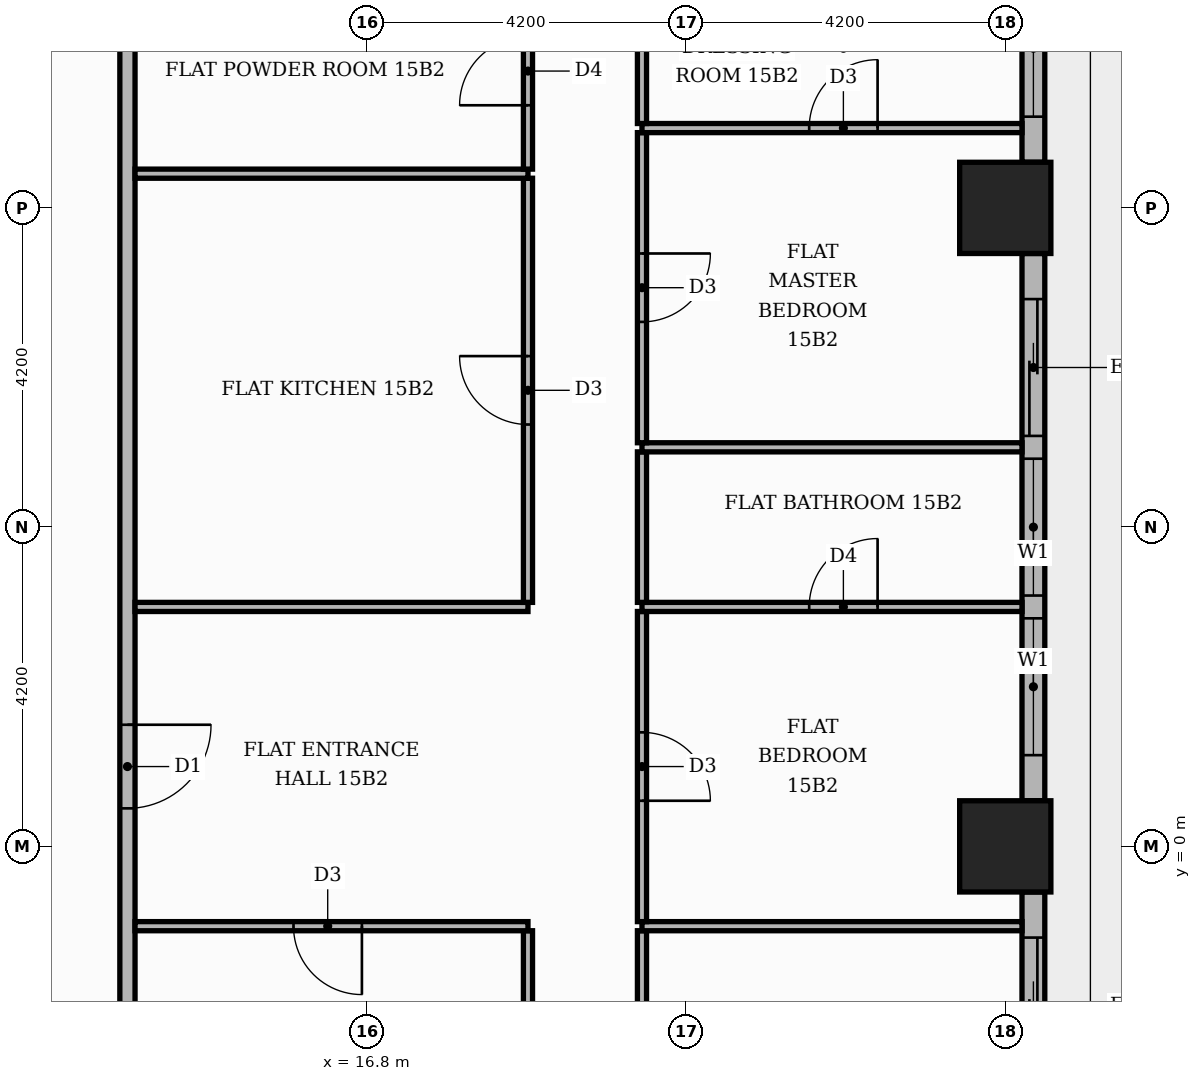
"""IFC4 building model, lengths in metres.
Left out: names, types, materials, properties, quantities, classifications, styles, units other than length and angle.
Written with IfcOpenShell. Run it as: python <this file> out.ifc"""

import sys

from ifc_helpers import new_model, si_unit, direction, frame, frame_2d, origin, origin_2d, place, context, subcontext, project, spatial, rectangle, extrude, element, fill, save


model = new_model("IFC4")
c1 = context("Model", 3, precision=1e-05, world=origin(), true_north=direction((0.0, 1.0)))
c2 = subcontext(c1, "Body", "Model", "MODEL_VIEW")
j1 = project(units=[si_unit("LENGTHUNIT", "METRE"), si_unit("PLANEANGLEUNIT", "RADIAN")], contexts=[c1])
p1 = place(None, origin())
s1 = spatial("IfcSite", under=j1, at=p1, CompositionType="ELEMENT")
p2 = place(p1, origin())
s2 = spatial("IfcBuilding", under=s1, at=p2, CompositionType="ELEMENT")
p3 = place(p2, frame((0.0, 0.0, 66.0)))
s3 = spatial("IfcBuildingStorey", under=s2, at=p3, CompositionType="ELEMENT", Elevation=66.0)
for number, where, z_axis, x_axis in (
    (1, (25.2, 0.0, 0.0), (0.0, 0.0, 1.0), (1.0, 0.0, 0.0)),
    (2, (25.2, 8.4, 0.0), (0.0, 0.0, 1.0), (1.0, 0.0, 0.0)),
):
    element("IfcColumn", number, at=place(p3, frame(where, z_axis=z_axis, x_axis=x_axis)), inside=s3, PredefinedType="COLUMN", context=c2, shape_type="SweptSolid", body=[
        extrude(rectangle(XDim=1.2, YDim=1.2, at=origin_2d()), origin(), (0.0, 0.0, 1.0), 3.9),
    ])
p4 = place(p3, frame((25.57, -7.8, 0.0), z_axis=(0.0, 0.0, 1.0), x_axis=(0.0, 1.0, 0.0)))
e3 = element("IfcWall", 3, at=p4, inside=s3, PredefinedType="STANDARD", context=c2, shape_type="SweptSolid", body=[
    extrude(rectangle(XDim=7.2, YDim=0.3, at=frame_2d((3.6, 0.0))), origin(), (0.0, 0.0, 1.0), 3.48),
])
p5 = place(p4, frame((0.6, 0.0, 0.9)))
e4 = element("IfcOpeningElement", 4, at=p5, cuts=e3, PredefinedType="OPENING", context=c2, shape_type="SweptSolid", body=[
    extrude(rectangle(XDim=1.8, YDim=2.1, at=frame_2d((0.9, 1.05))), frame((0.0, 0.16, 0.0), z_axis=(0.0, -1.0, 0.0), x_axis=(1.0, 0.0, 0.0)), (0.0, 0.0, 1.0), 0.32),
])
p6 = place(p4, frame((2.7, 0.0, 0.9)))
e5 = element("IfcOpeningElement", 5, at=p6, cuts=e3, PredefinedType="OPENING", context=c2, shape_type="SweptSolid", body=[
    extrude(rectangle(XDim=1.8, YDim=2.1, at=frame_2d((0.9, 1.05))), frame((0.0, 0.16, 0.0), z_axis=(0.0, -1.0, 0.0), x_axis=(1.0, 0.0, 0.0)), (0.0, 0.0, 1.0), 0.32),
])
p7 = place(p4, frame((4.8, 0.0, 0.0)))
e6 = element("IfcOpeningElement", 6, at=p7, cuts=e3, PredefinedType="OPENING", context=c2, shape_type="SweptSolid", body=[
    extrude(rectangle(XDim=1.8, YDim=2.4, at=frame_2d((0.9, 1.2))), frame((0.0, 0.16, 0.0), z_axis=(0.0, -1.0, 0.0), x_axis=(1.0, 0.0, 0.0)), (0.0, 0.0, 1.0), 0.32),
])
p8 = place(p3, frame((25.57, 0.6, 0.0), z_axis=(0.0, 0.0, 1.0), x_axis=(0.0, 1.0, 0.0)))
e7 = element("IfcWall", 7, at=p8, inside=s3, PredefinedType="STANDARD", context=c2, shape_type="SweptSolid", body=[
    extrude(rectangle(XDim=7.2, YDim=0.3, at=frame_2d((3.6, 0.0))), origin(), (0.0, 0.0, 1.0), 3.48),
])
p9 = place(p8, frame((0.6, 0.0, 0.9)))
e8 = element("IfcOpeningElement", 8, at=p9, cuts=e7, PredefinedType="OPENING", context=c2, shape_type="SweptSolid", body=[
    extrude(rectangle(XDim=1.8, YDim=2.1, at=frame_2d((0.9, 1.05))), frame((0.0, 0.16, 0.0), z_axis=(0.0, -1.0, 0.0), x_axis=(1.0, 0.0, 0.0)), (0.0, 0.0, 1.0), 0.32),
])
p10 = place(p8, frame((2.7, 0.0, 0.9)))
e9 = element("IfcOpeningElement", 9, at=p10, cuts=e7, PredefinedType="OPENING", context=c2, shape_type="SweptSolid", body=[
    extrude(rectangle(XDim=1.8, YDim=2.1, at=frame_2d((0.9, 1.05))), frame((0.0, 0.16, 0.0), z_axis=(0.0, -1.0, 0.0), x_axis=(1.0, 0.0, 0.0)), (0.0, 0.0, 1.0), 0.32),
])
p11 = place(p8, frame((4.8, 0.0, 0.0)))
e10 = element("IfcOpeningElement", 10, at=p11, cuts=e7, PredefinedType="OPENING", context=c2, shape_type="SweptSolid", body=[
    extrude(rectangle(XDim=1.8, YDim=2.4, at=frame_2d((0.9, 1.2))), frame((0.0, 0.16, 0.0), z_axis=(0.0, -1.0, 0.0), x_axis=(1.0, 0.0, 0.0)), (0.0, 0.0, 1.0), 0.32),
])
p12 = place(p3, frame((25.57, 9.0, 0.0), z_axis=(0.0, 0.0, 1.0), x_axis=(0.0, 1.0, 0.0)))
e11 = element("IfcWall", 11, at=p12, inside=s3, PredefinedType="STANDARD", context=c2, shape_type="SweptSolid", body=[
    extrude(rectangle(XDim=7.2, YDim=0.3, at=frame_2d((3.6, 0.0))), origin(), (0.0, 0.0, 1.0), 3.48),
])
p13 = place(p12, frame((0.6, 0.0, 0.9)))
e12 = element("IfcOpeningElement", 12, at=p13, cuts=e11, PredefinedType="OPENING", context=c2, shape_type="SweptSolid", body=[
    extrude(rectangle(XDim=1.8, YDim=2.1, at=frame_2d((0.9, 1.05))), frame((0.0, 0.16, 0.0), z_axis=(0.0, -1.0, 0.0), x_axis=(1.0, 0.0, 0.0)), (0.0, 0.0, 1.0), 0.32),
])
p14 = place(p12, frame((2.7, 0.0, 0.9)))
e13 = element("IfcOpeningElement", 13, at=p14, cuts=e11, PredefinedType="OPENING", context=c2, shape_type="SweptSolid", body=[
    extrude(rectangle(XDim=1.8, YDim=2.1, at=frame_2d((0.9, 1.05))), frame((0.0, 0.16, 0.0), z_axis=(0.0, -1.0, 0.0), x_axis=(1.0, 0.0, 0.0)), (0.0, 0.0, 1.0), 0.32),
])
p15 = place(p12, frame((4.8, 0.0, 0.9)))
e14 = element("IfcOpeningElement", 14, at=p15, cuts=e11, PredefinedType="OPENING", context=c2, shape_type="SweptSolid", body=[
    extrude(rectangle(XDim=1.8, YDim=2.1, at=frame_2d((0.9, 1.05))), frame((0.0, 0.16, 0.0), z_axis=(0.0, -1.0, 0.0), x_axis=(1.0, 0.0, 0.0)), (0.0, 0.0, 1.0), 0.32),
])
p16 = place(p3, frame((13.65, -5.15, 0.0), z_axis=(0.0, 0.0, 1.0), x_axis=(0.0, 1.0, 0.0)))
e15 = element("IfcWall", 15, at=p16, inside=s3, PredefinedType="PARTITIONING", context=c2, shape_type="SweptSolid", body=[
    extrude(rectangle(XDim=18.7, YDim=0.2, at=frame_2d((9.35, 0.0))), origin(), (0.0, 0.0, 1.0), 3.48),
])
p17 = place(p16, frame((5.65, 0.0, 0.0)))
e16 = element("IfcOpeningElement", 16, at=p17, cuts=e15, PredefinedType="OPENING", context=c2, shape_type="SweptSolid", body=[
    extrude(rectangle(XDim=1.1, YDim=2.4, at=frame_2d((0.55, 1.2))), frame((0.0, 0.11, 0.0), z_axis=(0.0, -1.0, 0.0), x_axis=(1.0, 0.0, 0.0)), (0.0, 0.0, 1.0), 0.22),
])
p18 = place(p3, frame((18.92, -5.15, 0.0), z_axis=(0.0, 0.0, 1.0), x_axis=(0.0, 1.0, 0.0)))
e17 = element("IfcWall", 17, at=p18, inside=s3, PredefinedType="PARTITIONING", context=c2, shape_type="SweptSolid", body=[
    extrude(rectangle(XDim=4.04, YDim=0.12, at=frame_2d((2.02, 0.0))), origin(), (0.0, 0.0, 1.0), 3.48),
])
p19 = place(p3, frame((20.42, -5.15, 0.0), z_axis=(0.0, 0.0, 1.0), x_axis=(0.0, 1.0, 0.0)))
e18 = element("IfcWall", 18, at=p19, inside=s3, PredefinedType="PARTITIONING", context=c2, shape_type="SweptSolid", body=[
    extrude(rectangle(XDim=4.04, YDim=0.12, at=frame_2d((2.02, 0.0))), origin(), (0.0, 0.0, 1.0), 3.48),
])
p20 = place(p19, frame((1.5, 0.0, 0.0)))
e19 = element("IfcOpeningElement", 19, at=p20, cuts=e18, PredefinedType="OPENING", context=c2, shape_type="SweptSolid", body=[
    extrude(rectangle(XDim=1.0, YDim=2.1, at=frame_2d((0.5, 1.05))), frame((0.0, 0.07, 0.0), z_axis=(0.0, -1.0, 0.0), x_axis=(1.0, 0.0, 0.0)), (0.0, 0.0, 1.0), 0.14),
])
p21 = place(p3, frame((13.75, -1.05, 0.0), z_axis=(0.0, 0.0, 1.0), x_axis=(1.0, 0.0, 0.0)))
e20 = element("IfcWall", 20, at=p21, inside=s3, PredefinedType="PARTITIONING", context=c2, shape_type="SweptSolid", body=[
    extrude(rectangle(XDim=5.17, YDim=0.12, at=frame_2d((2.585, 0.0))), origin(), (0.0, 0.0, 1.0), 3.48),
])
p22 = place(p21, frame((2.085, 0.0, 0.0)))
e21 = element("IfcOpeningElement", 21, at=p22, cuts=e20, PredefinedType="OPENING", context=c2, shape_type="SweptSolid", body=[
    extrude(rectangle(XDim=0.9, YDim=2.1, at=frame_2d((0.45, 1.05))), frame((0.0, 0.07, 0.0), z_axis=(0.0, -1.0, 0.0), x_axis=(1.0, 0.0, 0.0)), (0.0, 0.0, 1.0), 0.14),
])
p23 = place(p3, frame((20.42, -1.05, 0.0), z_axis=(0.0, 0.0, 1.0), x_axis=(1.0, 0.0, 0.0)))
e22 = element("IfcWall", 22, at=p23, inside=s3, PredefinedType="PARTITIONING", context=c2, shape_type="SweptSolid", body=[
    extrude(rectangle(XDim=5.0, YDim=0.12, at=frame_2d((2.5, 0.0))), origin(), (0.0, 0.0, 1.0), 3.48),
])
p24 = place(p3, frame((20.42, -0.99, 0.0), z_axis=(0.0, 0.0, 1.0), x_axis=(0.0, 1.0, 0.0)))
e23 = element("IfcWall", 23, at=p24, inside=s3, PredefinedType="PARTITIONING", context=c2, shape_type="SweptSolid", body=[
    extrude(rectangle(XDim=4.08, YDim=0.12, at=frame_2d((2.04, 0.0))), origin(), (0.0, 0.0, 1.0), 3.48),
])
p25 = place(p24, frame((1.59, 0.0, 0.0)))
e24 = element("IfcOpeningElement", 24, at=p25, cuts=e23, PredefinedType="OPENING", context=c2, shape_type="SweptSolid", body=[
    extrude(rectangle(XDim=0.9, YDim=2.1, at=frame_2d((0.45, 1.05))), frame((0.0, 0.07, 0.0), z_axis=(0.0, -1.0, 0.0), x_axis=(1.0, 0.0, 0.0)), (0.0, 0.0, 1.0), 0.14),
])
p26 = place(p3, frame((13.75, 3.15, 0.0), z_axis=(0.0, 0.0, 1.0), x_axis=(1.0, 0.0, 0.0)))
e25 = element("IfcWall", 25, at=p26, inside=s3, PredefinedType="PARTITIONING", context=c2, shape_type="SweptSolid", body=[
    extrude(rectangle(XDim=5.17, YDim=0.12, at=frame_2d((2.585, 0.0))), origin(), (0.0, 0.0, 1.0), 3.48),
])
p27 = place(p3, frame((20.42, 3.15, 0.0), z_axis=(0.0, 0.0, 1.0), x_axis=(1.0, 0.0, 0.0)))
e26 = element("IfcWall", 26, at=p27, inside=s3, PredefinedType="PARTITIONING", context=c2, shape_type="SweptSolid", body=[
    extrude(rectangle(XDim=5.0, YDim=0.12, at=frame_2d((2.5, 0.0))), origin(), (0.0, 0.0, 1.0), 3.48),
])
p28 = place(p27, frame((2.2, 0.0, 0.0)))
e27 = element("IfcOpeningElement", 27, at=p28, cuts=e26, PredefinedType="OPENING", context=c2, shape_type="SweptSolid", body=[
    extrude(rectangle(XDim=0.9, YDim=2.1, at=frame_2d((0.45, 1.05))), frame((0.0, 0.07, 0.0), z_axis=(0.0, -1.0, 0.0), x_axis=(1.0, 0.0, 0.0)), (0.0, 0.0, 1.0), 0.14),
])
p29 = place(p3, frame((18.92, 3.21, 0.0), z_axis=(0.0, 0.0, 1.0), x_axis=(0.0, 1.0, 0.0)))
e28 = element("IfcWall", 28, at=p29, inside=s3, PredefinedType="PARTITIONING", context=c2, shape_type="SweptSolid", body=[
    extrude(rectangle(XDim=5.58, YDim=0.12, at=frame_2d((2.79, 0.0))), origin(), (0.0, 0.0, 1.0), 3.48),
])
p30 = place(p29, frame((2.34, 0.0, 0.0)))
e29 = element("IfcOpeningElement", 29, at=p30, cuts=e28, PredefinedType="OPENING", context=c2, shape_type="SweptSolid", body=[
    extrude(rectangle(XDim=0.9, YDim=2.1, at=frame_2d((0.45, 1.05))), frame((0.0, 0.07, 0.0), z_axis=(0.0, -1.0, 0.0), x_axis=(1.0, 0.0, 0.0)), (0.0, 0.0, 1.0), 0.14),
])
p31 = place(p3, frame((20.42, 3.21, 0.0), z_axis=(0.0, 0.0, 1.0), x_axis=(0.0, 1.0, 0.0)))
e30 = element("IfcWall", 30, at=p31, inside=s3, PredefinedType="PARTITIONING", context=c2, shape_type="SweptSolid", body=[
    extrude(rectangle(XDim=1.98, YDim=0.12, at=frame_2d((0.99, 0.0))), origin(), (0.0, 0.0, 1.0), 3.48),
])
p32 = place(p3, frame((20.42, 5.25, 0.0), z_axis=(0.0, 0.0, 1.0), x_axis=(1.0, 0.0, 0.0)))
e31 = element("IfcWall", 31, at=p32, inside=s3, PredefinedType="PARTITIONING", context=c2, shape_type="SweptSolid", body=[
    extrude(rectangle(XDim=5.0, YDim=0.12, at=frame_2d((2.5, 0.0))), origin(), (0.0, 0.0, 1.0), 3.48),
])
p33 = place(p3, frame((20.42, 5.31, 0.0), z_axis=(0.0, 0.0, 1.0), x_axis=(0.0, 1.0, 0.0)))
e32 = element("IfcWall", 32, at=p33, inside=s3, PredefinedType="PARTITIONING", context=c2, shape_type="SweptSolid", body=[
    extrude(rectangle(XDim=4.08, YDim=0.12, at=frame_2d((2.04, 0.0))), origin(), (0.0, 0.0, 1.0), 3.48),
])
p34 = place(p33, frame((1.59, 0.0, 0.0)))
e33 = element("IfcOpeningElement", 33, at=p34, cuts=e32, PredefinedType="OPENING", context=c2, shape_type="SweptSolid", body=[
    extrude(rectangle(XDim=0.9, YDim=2.1, at=frame_2d((0.45, 1.05))), frame((0.0, 0.07, 0.0), z_axis=(0.0, -1.0, 0.0), x_axis=(1.0, 0.0, 0.0)), (0.0, 0.0, 1.0), 0.14),
])
p35 = place(p3, frame((13.75, 8.85, 0.0), z_axis=(0.0, 0.0, 1.0), x_axis=(1.0, 0.0, 0.0)))
e34 = element("IfcWall", 34, at=p35, inside=s3, PredefinedType="PARTITIONING", context=c2, shape_type="SweptSolid", body=[
    extrude(rectangle(XDim=5.17, YDim=0.12, at=frame_2d((2.585, 0.0))), origin(), (0.0, 0.0, 1.0), 3.48),
])
p36 = place(p3, frame((18.92, 8.91, 0.0), z_axis=(0.0, 0.0, 1.0), x_axis=(0.0, 1.0, 0.0)))
e35 = element("IfcWall", 35, at=p36, inside=s3, PredefinedType="PARTITIONING", context=c2, shape_type="SweptSolid", body=[
    extrude(rectangle(XDim=2.58, YDim=0.12, at=frame_2d((1.29, 0.0))), origin(), (0.0, 0.0, 1.0), 3.48),
])
p37 = place(p36, frame((0.84, 0.0, 0.0)))
e36 = element("IfcOpeningElement", 36, at=p37, cuts=e35, PredefinedType="OPENING", context=c2, shape_type="SweptSolid", body=[
    extrude(rectangle(XDim=0.9, YDim=2.1, at=frame_2d((0.45, 1.05))), frame((0.0, 0.07, 0.0), z_axis=(0.0, -1.0, 0.0), x_axis=(1.0, 0.0, 0.0)), (0.0, 0.0, 1.0), 0.14),
])
p38 = place(p3, frame((20.42, 9.45, 0.0), z_axis=(0.0, 0.0, 1.0), x_axis=(1.0, 0.0, 0.0)))
e37 = element("IfcWall", 37, at=p38, inside=s3, PredefinedType="PARTITIONING", context=c2, shape_type="SweptSolid", body=[
    extrude(rectangle(XDim=5.0, YDim=0.12, at=frame_2d((2.5, 0.0))), origin(), (0.0, 0.0, 1.0), 3.48),
])
p39 = place(p38, frame((2.2, 0.0, 0.0)))
e38 = element("IfcOpeningElement", 38, at=p39, cuts=e37, PredefinedType="OPENING", context=c2, shape_type="SweptSolid", body=[
    extrude(rectangle(XDim=0.9, YDim=2.1, at=frame_2d((0.45, 1.05))), frame((0.0, 0.07, 0.0), z_axis=(0.0, -1.0, 0.0), x_axis=(1.0, 0.0, 0.0)), (0.0, 0.0, 1.0), 0.14),
])
p40 = place(p3, frame((20.42, 9.51, 0.0), z_axis=(0.0, 0.0, 1.0), x_axis=(0.0, 1.0, 0.0)))
e39 = element("IfcWall", 39, at=p40, inside=s3, PredefinedType="PARTITIONING", context=c2, shape_type="SweptSolid", body=[
    extrude(rectangle(XDim=1.98, YDim=0.12, at=frame_2d((0.99, 0.0))), origin(), (0.0, 0.0, 1.0), 3.48),
])
p41 = place(p7, origin())
e40 = element("IfcDoor", 40, at=p41, inside=s3, OperationType="SLIDING_TO_RIGHT", PredefinedType="DOOR", context=c2, shape_type="SweptSolid", body=[
    extrude(rectangle(XDim=1.8, YDim=2.4, at=frame_2d((0.9, 1.2))), frame((0.0, 0.025, 0.0), z_axis=(0.0, -1.0, 0.0), x_axis=(1.0, 0.0, 0.0)), (0.0, 0.0, 1.0), 0.05),
])
fill(e6, e40)
p42 = place(p9, origin())
e41 = element("IfcWindow", 41, at=p42, inside=s3, PartitioningType="SINGLE_PANEL", PredefinedType="WINDOW", context=c2, shape_type="SweptSolid", body=[
    extrude(rectangle(XDim=1.8, YDim=2.1, at=frame_2d((0.9, 1.05))), frame((0.0, 0.03, 0.0), z_axis=(0.0, -1.0, 0.0), x_axis=(1.0, 0.0, 0.0)), (0.0, 0.0, 1.0), 0.06),
])
fill(e8, e41)
p43 = place(p10, origin())
e42 = element("IfcWindow", 42, at=p43, inside=s3, PartitioningType="SINGLE_PANEL", PredefinedType="WINDOW", context=c2, shape_type="SweptSolid", body=[
    extrude(rectangle(XDim=1.8, YDim=2.1, at=frame_2d((0.9, 1.05))), frame((0.0, 0.03, 0.0), z_axis=(0.0, -1.0, 0.0), x_axis=(1.0, 0.0, 0.0)), (0.0, 0.0, 1.0), 0.06),
])
fill(e9, e42)
p44 = place(p11, origin())
e43 = element("IfcDoor", 43, at=p44, inside=s3, OperationType="SLIDING_TO_RIGHT", PredefinedType="DOOR", context=c2, shape_type="SweptSolid", body=[
    extrude(rectangle(XDim=1.8, YDim=2.4, at=frame_2d((0.9, 1.2))), frame((0.0, 0.025, 0.0), z_axis=(0.0, -1.0, 0.0), x_axis=(1.0, 0.0, 0.0)), (0.0, 0.0, 1.0), 0.05),
])
fill(e10, e43)
p45 = place(p13, origin())
e44 = element("IfcWindow", 44, at=p45, inside=s3, PartitioningType="SINGLE_PANEL", PredefinedType="WINDOW", context=c2, shape_type="SweptSolid", body=[
    extrude(rectangle(XDim=1.8, YDim=2.1, at=frame_2d((0.9, 1.05))), frame((0.0, 0.03, 0.0), z_axis=(0.0, -1.0, 0.0), x_axis=(1.0, 0.0, 0.0)), (0.0, 0.0, 1.0), 0.06),
])
fill(e12, e44)
p46 = place(p17, frame((1.1, 0.0, 0.0), z_axis=(0.0, 0.0, 1.0), x_axis=(-1.0, 0.0, 0.0)))
e45 = element("IfcDoor", 45, at=p46, inside=s3, OperationType="SINGLE_SWING_RIGHT", PredefinedType="DOOR", context=c2, shape_type="SweptSolid", body=[
    extrude(rectangle(XDim=1.1, YDim=2.4, at=frame_2d((0.55, 1.2))), frame((0.0, 0.025, 0.0), z_axis=(0.0, -1.0, 0.0), x_axis=(1.0, 0.0, 0.0)), (0.0, 0.0, 1.0), 0.05),
])
fill(e16, e45)
p47 = place(p22, frame((0.9, 0.0, 0.0), z_axis=(0.0, 0.0, 1.0), x_axis=(-1.0, 0.0, 0.0)))
e46 = element("IfcDoor", 46, at=p47, inside=s3, OperationType="SINGLE_SWING_RIGHT", PredefinedType="DOOR", context=c2, shape_type="SweptSolid", body=[
    extrude(rectangle(XDim=0.9, YDim=2.1, at=frame_2d((0.45, 1.05))), frame((0.0, 0.025, 0.0), z_axis=(0.0, -1.0, 0.0), x_axis=(1.0, 0.0, 0.0)), (0.0, 0.0, 1.0), 0.05),
])
fill(e21, e46)
p48 = place(p30, origin())
e47 = element("IfcDoor", 47, at=p48, inside=s3, OperationType="SINGLE_SWING_RIGHT", PredefinedType="DOOR", context=c2, shape_type="SweptSolid", body=[
    extrude(rectangle(XDim=0.9, YDim=2.1, at=frame_2d((0.45, 1.05))), frame((0.0, 0.025, 0.0), z_axis=(0.0, -1.0, 0.0), x_axis=(1.0, 0.0, 0.0)), (0.0, 0.0, 1.0), 0.05),
])
fill(e29, e47)
p49 = place(p37, origin())
e48 = element("IfcDoor", 48, at=p49, inside=s3, OperationType="SINGLE_SWING_LEFT", PredefinedType="DOOR", context=c2, shape_type="SweptSolid", body=[
    extrude(rectangle(XDim=0.9, YDim=2.1, at=frame_2d((0.45, 1.05))), frame((0.0, 0.025, 0.0), z_axis=(0.0, -1.0, 0.0), x_axis=(1.0, 0.0, 0.0)), (0.0, 0.0, 1.0), 0.05),
])
fill(e36, e48)
p50 = place(p25, frame((0.9, 0.0, 0.0), z_axis=(0.0, 0.0, 1.0), x_axis=(-1.0, 0.0, 0.0)))
e49 = element("IfcDoor", 49, at=p50, inside=s3, OperationType="SINGLE_SWING_LEFT", PredefinedType="DOOR", context=c2, shape_type="SweptSolid", body=[
    extrude(rectangle(XDim=0.9, YDim=2.1, at=frame_2d((0.45, 1.05))), frame((0.0, 0.025, 0.0), z_axis=(0.0, -1.0, 0.0), x_axis=(1.0, 0.0, 0.0)), (0.0, 0.0, 1.0), 0.05),
])
fill(e24, e49)
p51 = place(p28, origin())
e50 = element("IfcDoor", 50, at=p51, inside=s3, OperationType="SINGLE_SWING_RIGHT", PredefinedType="DOOR", context=c2, shape_type="SweptSolid", body=[
    extrude(rectangle(XDim=0.9, YDim=2.1, at=frame_2d((0.45, 1.05))), frame((0.0, 0.025, 0.0), z_axis=(0.0, -1.0, 0.0), x_axis=(1.0, 0.0, 0.0)), (0.0, 0.0, 1.0), 0.05),
])
fill(e27, e50)
p52 = place(p34, frame((0.9, 0.0, 0.0), z_axis=(0.0, 0.0, 1.0), x_axis=(-1.0, 0.0, 0.0)))
e51 = element("IfcDoor", 51, at=p52, inside=s3, OperationType="SINGLE_SWING_RIGHT", PredefinedType="DOOR", context=c2, shape_type="SweptSolid", body=[
    extrude(rectangle(XDim=0.9, YDim=2.1, at=frame_2d((0.45, 1.05))), frame((0.0, 0.025, 0.0), z_axis=(0.0, -1.0, 0.0), x_axis=(1.0, 0.0, 0.0)), (0.0, 0.0, 1.0), 0.05),
])
fill(e33, e51)
p53 = place(p39, origin())
e52 = element("IfcDoor", 52, at=p53, inside=s3, OperationType="SINGLE_SWING_RIGHT", PredefinedType="DOOR", context=c2, shape_type="SweptSolid", body=[
    extrude(rectangle(XDim=0.9, YDim=2.1, at=frame_2d((0.45, 1.05))), frame((0.0, 0.025, 0.0), z_axis=(0.0, -1.0, 0.0), x_axis=(1.0, 0.0, 0.0)), (0.0, 0.0, 1.0), 0.05),
])
fill(e38, e52)
save(model, sys.argv[1])
